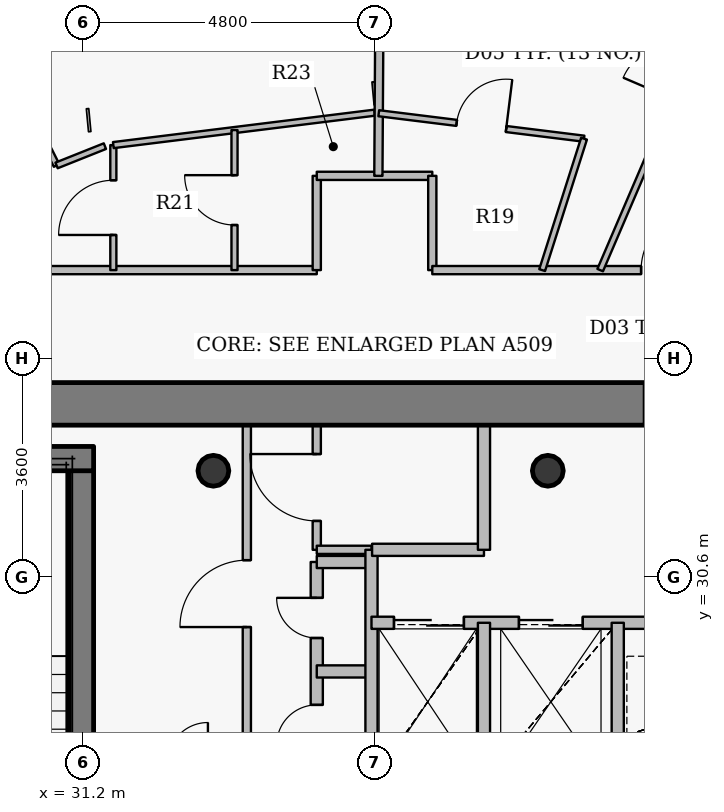
"""IFC4 building model, lengths in metres.
Left out: names, types, materials, properties, quantities, classifications, styles, units other than length and angle.
Written with IfcOpenShell. Run it as: python <this file> out.ifc"""

import sys

from ifc_helpers import new_model, si_unit, direction, frame, frame_2d, origin, origin_2d, place, context, subcontext, project, spatial, rectangle, hollow_circle, extrude, source, transform, mapped, element, fill, save


model = new_model("IFC4")
c1 = context("Model", 3, precision=1e-05, world=origin(), true_north=direction((0.0, 1.0)))
c2 = subcontext(c1, "Body", "Model", "MODEL_VIEW")
j1 = project(units=[si_unit("LENGTHUNIT", "METRE"), si_unit("PLANEANGLEUNIT", "RADIAN")], contexts=[c1])
p1 = place(None, origin())
s1 = spatial("IfcSite", under=j1, at=p1, CompositionType="ELEMENT")
p2 = place(p1, origin())
s2 = spatial("IfcBuilding", under=s1, at=p2, CompositionType="ELEMENT")
p3 = place(p2, frame((0.0, 0.0, 331.6)))
s3 = spatial("IfcBuildingStorey", under=s2, at=p3, CompositionType="ELEMENT", Elevation=331.6)
for number, where, z_axis, x_axis in (
    (1, (38.85, 32.35, 0.0), (0.0, 0.0, 1.0), (1.0, 0.0, 0.0)),
    (2, (33.35, 32.35, 0.0), (0.0, 0.0, 1.0), (1.0, 0.0, 0.0)),
):
    element("IfcColumn", number, at=place(p3, frame(where, z_axis=z_axis, x_axis=x_axis)), inside=s3, PredefinedType="COLUMN", context=c2, shape_type="SweptSolid", body=[
        extrude(hollow_circle(Radius=0.254, WallThickness=0.02, at=origin_2d()), origin(), (0.0, 0.0, 1.0), 3.8),
    ])
p4 = place(p3, frame((31.18, 27.8, 0.0), z_axis=(0.0, 0.0, 1.0), x_axis=(0.0, 1.0, 0.0)))
e3 = element("IfcWall", 3, at=p4, inside=s3, PredefinedType="SHEAR", context=c2, shape_type="SweptSolid", body=[
    extrude(rectangle(XDim=4.75, YDim=0.4, at=frame_2d((2.375, 0.0))), origin(), (0.0, 0.0, 1.0), 3.8),
])
p5 = place(p3, frame((27.25, 32.55, 0.0), z_axis=(0.0, 0.0, 1.0), x_axis=(1.0, 0.0, 0.0)))
e4 = element("IfcWall", 4, at=p5, inside=s3, PredefinedType="SHEAR", context=c2, shape_type="SweptSolid", body=[
    extrude(rectangle(XDim=4.13, YDim=0.4, at=frame_2d((2.065, 0.0))), origin(), (0.0, 0.0, 1.0), 3.8),
])
p6 = place(p3, frame((27.6, 33.45, 0.0), z_axis=(0.0, 0.0, 1.0), x_axis=(1.0, 0.0, 0.0)))
e5 = element("IfcWall", 5, at=p6, inside=s3, PredefinedType="SHEAR", context=c2, shape_type="SweptSolid", body=[
    extrude(rectangle(XDim=16.8, YDim=0.7, at=frame_2d((8.4, 0.0))), origin(), (0.0, 0.0, 1.0), 3.1),
])
p7 = place(p6, frame((12.85, 0.0, 0.0)))
e6 = element("IfcOpeningElement", 6, at=p7, cuts=e5, PredefinedType="OPENING", context=c2, shape_type="SweptSolid", body=[
    extrude(rectangle(XDim=1.15, YDim=2.15, at=origin_2d()), frame((0.575, 0.36, 1.075), z_axis=(0.0, -1.0, 0.0), x_axis=(1.0, 0.0, 0.0)), (0.0, 0.0, 1.0), 0.72),
])
p8 = place(p3, frame((26.58, 35.65, 0.0), z_axis=(0.0, 0.0, 1.0), x_axis=(1.0, 0.0, 0.0)))
e7 = element("IfcWall", 7, at=p8, inside=s3, PredefinedType="PARTITIONING", context=c2, shape_type="SweptSolid", body=[
    extrude(rectangle(XDim=8.47, YDim=0.135, at=frame_2d((4.235, 0.0))), origin(), (0.0, 0.0, 1.0), 3.085),
])
p9 = place(p8, frame((2.082, 0.0, 0.0)))
e8 = element("IfcOpeningElement", 8, at=p9, cuts=e7, PredefinedType="OPENING", context=c2, shape_type="SweptSolid", body=[
    extrude(rectangle(XDim=1.0, YDim=2.15, at=origin_2d()), frame((0.5, 0.078, 1.075), z_axis=(0.0, -1.0, 0.0), x_axis=(1.0, 0.0, 0.0)), (0.0, 0.0, 1.0), 0.155),
])
p10 = place(p3, frame((28.548, 41.781, 0.0), z_axis=(0.0, 0.0, 1.0), x_axis=(0.450197256642, -0.892929129389, 0.0)))
e9 = element("IfcWall", 9, at=p10, inside=s3, PredefinedType="PARTITIONING", context=c2, shape_type="SweptSolid", body=[
    extrude(rectangle(XDim=4.938, YDim=0.1, at=frame_2d((2.469, 0.0))), origin(), (0.0, 0.0, 1.0), 3.035),
])
p11 = place(p10, frame((2.019, 0.0, 0.0)))
e10 = element("IfcOpeningElement", 10, at=p11, cuts=e9, PredefinedType="OPENING", context=c2, shape_type="SweptSolid", body=[
    extrude(rectangle(XDim=0.9, YDim=2.1, at=origin_2d()), frame((0.45, 0.06, 1.05), z_axis=(0.0, -1.0, 0.0), x_axis=(1.0, 0.0, 0.0)), (0.0, 0.0, 1.0), 0.12),
])
p12 = place(p3, frame((30.771, 37.371, 0.0), z_axis=(0.0, 0.0, 1.0), x_axis=(0.928810758689, 0.370554415091, 0.0)))
e11 = element("IfcWall", 11, at=p12, inside=s3, PredefinedType="PARTITIONING", context=c2, shape_type="SweptSolid", body=[
    extrude(rectangle(XDim=0.856, YDim=0.1, at=frame_2d((0.428, 0.0))), origin(), (0.0, 0.0, 1.0), 3.085),
])
p13 = place(p3, frame((31.704, 35.65, 0.0), z_axis=(0.0, 0.0, 1.0), x_axis=(0.0, 1.0, 0.0)))
e12 = element("IfcWall", 12, at=p13, inside=s3, PredefinedType="PARTITIONING", context=c2, shape_type="SweptSolid", body=[
    extrude(rectangle(XDim=2.056, YDim=0.1, at=frame_2d((1.028, 0.0))), origin(), (0.0, 0.0, 1.0), 3.085),
])
p14 = place(p13, frame((0.578, 0.0, 0.0)))
e13 = element("IfcOpeningElement", 13, at=p14, cuts=e12, PredefinedType="OPENING", context=c2, shape_type="SweptSolid", body=[
    extrude(rectangle(XDim=0.9, YDim=2.1, at=origin_2d()), frame((0.45, 0.06, 1.05), z_axis=(0.0, -1.0, 0.0), x_axis=(1.0, 0.0, 0.0)), (0.0, 0.0, 1.0), 0.12),
])
p15 = place(p3, frame((31.704, 37.706, 0.0), z_axis=(0.0, 0.0, 1.0), x_axis=(0.992391131504, 0.123125310604, 0.0)))
e14 = element("IfcWall", 14, at=p15, inside=s3, PredefinedType="PARTITIONING", context=c2, shape_type="SweptSolid", body=[
    extrude(rectangle(XDim=4.329, YDim=0.1, at=frame_2d((2.164, 0.0))), origin(), (0.0, 0.0, 1.0), 3.085),
])
p16 = place(p3, frame((33.697, 35.65, 0.0), z_axis=(0.0, 0.0, 1.0), x_axis=(0.0, 1.0, 0.0)))
e15 = element("IfcWall", 15, at=p16, inside=s3, PredefinedType="PARTITIONING", context=c2, shape_type="SweptSolid", body=[
    extrude(rectangle(XDim=2.303, YDim=0.1, at=frame_2d((1.151, 0.0))), origin(), (0.0, 0.0, 1.0), 3.55),
])
p17 = place(p16, frame((0.741, 0.0, 0.0)))
e16 = element("IfcOpeningElement", 16, at=p17, cuts=e15, PredefinedType="OPENING", context=c2, shape_type="SweptSolid", body=[
    extrude(rectangle(XDim=0.82, YDim=2.1, at=origin_2d()), frame((0.41, 0.06, 1.05), z_axis=(0.0, -1.0, 0.0), x_axis=(1.0, 0.0, 0.0)), (0.0, 0.0, 1.0), 0.12),
])
p18 = place(p3, frame((33.9, 27.56, 0.0), z_axis=(0.0, 0.0, 1.0), x_axis=(0.0, 1.0, 0.0)))
e17 = element("IfcWall", 17, at=p18, inside=s3, PredefinedType="PARTITIONING", context=c2, shape_type="SweptSolid", body=[
    extrude(rectangle(XDim=5.54, YDim=0.135, at=frame_2d((2.77, 0.0))), origin(), (0.0, 0.0, 1.0), 3.135),
])
p19 = place(p18, frame((2.22, 0.0, 0.0)))
e18 = element("IfcOpeningElement", 18, at=p19, cuts=e17, PredefinedType="OPENING", context=c2, shape_type="SweptSolid", body=[
    extrude(rectangle(XDim=1.1, YDim=2.15, at=origin_2d()), frame((0.55, 0.078, 1.075), z_axis=(0.0, -1.0, 0.0), x_axis=(1.0, 0.0, 0.0)), (0.0, 0.0, 1.0), 0.155),
])
p20 = place(p3, frame((35.05, 27.25, 0.0), z_axis=(0.0, 0.0, 1.0), x_axis=(0.0, 1.0, 0.0)))
e19 = element("IfcWall", 19, at=p20, inside=s3, PredefinedType="PARTITIONING", context=c2, shape_type="SweptSolid", body=[
    extrude(rectangle(XDim=3.6, YDim=0.2, at=frame_2d((1.8, 0.0))), origin(), (0.0, 0.0, 1.0), 3.55),
])
p21 = place(p20, frame((0.59, 0.0, 0.0)))
e20 = element("IfcOpeningElement", 20, at=p21, cuts=e19, PredefinedType="OPENING", context=c2, shape_type="SweptSolid", body=[
    extrude(rectangle(XDim=0.66, YDim=2.05, at=origin_2d()), frame((0.33, 0.11, 1.025), z_axis=(0.0, -1.0, 0.0), x_axis=(1.0, 0.0, 0.0)), (0.0, 0.0, 1.0), 0.22),
])
p22 = place(p20, frame((2.35, 0.0, 0.0)))
e21 = element("IfcOpeningElement", 21, at=p22, cuts=e19, PredefinedType="OPENING", context=c2, shape_type="SweptSolid", body=[
    extrude(rectangle(XDim=0.66, YDim=2.05, at=origin_2d()), frame((0.33, 0.11, 1.025), z_axis=(0.0, -1.0, 0.0), x_axis=(1.0, 0.0, 0.0)), (0.0, 0.0, 1.0), 0.22),
])
for number, where, z_axis, x_axis in (
    (22, (35.05, 29.05, 0.0), (0.0, 0.0, 1.0), (1.0, 0.0, 0.0)),
    (23, (35.05, 30.85, 0.0), (0.0, 0.0, 1.0), (1.0, 0.0, 0.0)),
):
    element("IfcWall", number, at=place(p3, frame(where, z_axis=z_axis, x_axis=x_axis)), inside=s3, PredefinedType="PARTITIONING", context=c2, shape_type="SweptSolid", body=[
        extrude(rectangle(XDim=0.9, YDim=0.2, at=frame_2d((0.45, 0.0))), origin(), (0.0, 0.0, 1.0), 3.55),
    ])
p23 = place(p3, frame((35.05, 31.05, 0.0), z_axis=(0.0, 0.0, 1.0), x_axis=(0.0, 1.0, 0.0)))
e24 = element("IfcWall", 24, at=p23, inside=s3, PredefinedType="PARTITIONING", context=c2, shape_type="SweptSolid", body=[
    extrude(rectangle(XDim=2.05, YDim=0.135, at=frame_2d((1.025, 0.0))), origin(), (0.0, 0.0, 1.0), 3.135),
])
p24 = place(p23, frame((0.475, 0.0, 0.0)))
e25 = element("IfcOpeningElement", 25, at=p24, cuts=e24, PredefinedType="OPENING", context=c2, shape_type="SweptSolid", body=[
    extrude(rectangle(XDim=1.1, YDim=2.15, at=origin_2d()), frame((0.55, 0.078, 1.075), z_axis=(0.0, -1.0, 0.0), x_axis=(1.0, 0.0, 0.0)), (0.0, 0.0, 1.0), 0.155),
])
p25 = place(p3, frame((35.05, 31.05, 0.0), z_axis=(0.0, 0.0, 1.0), x_axis=(1.0, 0.0, 0.0)))
e26 = element("IfcWall", 26, at=p25, inside=s3, PredefinedType="PARTITIONING", context=c2, shape_type="SweptSolid", body=[
    extrude(rectangle(XDim=0.9, YDim=0.135, at=frame_2d((0.45, 0.0))), origin(), (0.0, 0.0, 1.0), 3.55),
])
p26 = place(p3, frame((35.05, 35.65, 0.0), z_axis=(0.0, 0.0, 1.0), x_axis=(0.0, 1.0, 0.0)))
e27 = element("IfcWall", 27, at=p26, inside=s3, PredefinedType="PARTITIONING", context=c2, shape_type="SweptSolid", body=[
    extrude(rectangle(XDim=1.55, YDim=0.135, at=frame_2d((0.775, 0.0))), origin(), (0.0, 0.0, 1.0), 3.55),
])
p27 = place(p3, frame((35.05, 37.2, 0.0), z_axis=(0.0, 0.0, 1.0), x_axis=(1.0, 0.0, 0.0)))
e28 = element("IfcWall", 28, at=p27, inside=s3, PredefinedType="PARTITIONING", context=c2, shape_type="SweptSolid", body=[
    extrude(rectangle(XDim=1.9, YDim=0.135, at=frame_2d((0.95, 0.0))), origin(), (0.0, 0.0, 1.0), 3.085),
])
p28 = place(p3, frame((35.95, 27.25, 0.0), z_axis=(0.0, 0.0, 1.0), x_axis=(0.0, 1.0, 0.0)))
e29 = element("IfcWall", 29, at=p28, inside=s3, PredefinedType="PARTITIONING", context=c2, shape_type="SweptSolid", body=[
    extrude(rectangle(XDim=3.8, YDim=0.2, at=frame_2d((1.9, 0.0))), origin(), (0.0, 0.0, 1.0), 3.55),
])
p29 = place(p3, frame((35.95, 29.85, 0.0), z_axis=(0.0, 0.0, 1.0), x_axis=(1.0, 0.0, 0.0)))
e30 = element("IfcWall", 30, at=p29, inside=s3, PredefinedType="PARTITIONING", context=c2, shape_type="SweptSolid", body=[
    extrude(rectangle(XDim=8.49, YDim=0.2, at=frame_2d((4.245, 0.0))), origin(), (0.0, 0.0, 1.0), 3.135),
])
p30 = place(p29, frame((6.1, 0.0, 0.0)))
e31 = element("IfcOpeningElement", 31, at=p30, cuts=e30, PredefinedType="OPENING", context=c2, shape_type="SweptSolid", body=[
    extrude(rectangle(XDim=1.2, YDim=2.15, at=origin_2d()), frame((0.6, 0.11, 1.075), z_axis=(0.0, -1.0, 0.0), x_axis=(1.0, 0.0, 0.0)), (0.0, 0.0, 1.0), 0.22),
])
p31 = place(p29, frame((0.37, 0.0, 0.0)))
e32 = element("IfcOpeningElement", 32, at=p31, cuts=e30, PredefinedType="OPENING", context=c2, shape_type="SweptSolid", body=[
    extrude(rectangle(XDim=1.15, YDim=2.15, at=origin_2d()), frame((0.575, 0.11, 1.075), z_axis=(0.0, -1.0, 0.0), x_axis=(1.0, 0.0, 0.0)), (0.0, 0.0, 1.0), 0.22),
])
p32 = place(p29, frame((2.425, 0.0, 0.0)))
e33 = element("IfcOpeningElement", 33, at=p32, cuts=e30, PredefinedType="OPENING", context=c2, shape_type="SweptSolid", body=[
    extrude(rectangle(XDim=1.05, YDim=2.15, at=origin_2d()), frame((0.525, 0.11, 1.075), z_axis=(0.0, -1.0, 0.0), x_axis=(1.0, 0.0, 0.0)), (0.0, 0.0, 1.0), 0.22),
])
p33 = place(p3, frame((35.96, 31.05, 0.0), z_axis=(0.0, 0.0, 1.0), x_axis=(1.0, 0.0, 0.0)))
e34 = element("IfcWall", 34, at=p33, inside=s3, PredefinedType="PARTITIONING", context=c2, shape_type="SweptSolid", body=[
    extrude(rectangle(XDim=1.84, YDim=0.2, at=frame_2d((0.92, 0.0))), origin(), (0.0, 0.0, 1.0), 3.55),
])
p34 = place(p3, frame((36.063, 37.2, 0.0), z_axis=(0.0, 0.0, 1.0), x_axis=(0.006221912379, 0.999980643716, 0.0)))
e35 = element("IfcWall", 35, at=p34, inside=s3, PredefinedType="PARTITIONING", context=c2, shape_type="SweptSolid", body=[
    extrude(rectangle(XDim=5.729, YDim=0.135, at=frame_2d((2.864, 0.0))), origin(), (0.0, 0.0, 1.0), 3.085),
])
p35 = place(p3, frame((36.07, 38.23, 0.0), z_axis=(0.0, 0.0, 1.0), x_axis=(0.992395574795, -0.123089492354, 0.0)))
e36 = element("IfcWall", 36, at=p35, inside=s3, PredefinedType="PARTITIONING", context=c2, shape_type="SweptSolid", body=[
    extrude(rectangle(XDim=3.402, YDim=0.1, at=frame_2d((1.701, 0.0))), origin(), (0.0, 0.0, 1.0), 3.085),
])
p36 = place(p35, frame((1.291, 0.0, 0.0)))
e37 = element("IfcOpeningElement", 37, at=p36, cuts=e36, PredefinedType="OPENING", context=c2, shape_type="SweptSolid", body=[
    extrude(rectangle(XDim=0.82, YDim=2.1, at=origin_2d()), frame((0.41, 0.06, 1.05), z_axis=(0.0, -1.0, 0.0), x_axis=(1.0, 0.0, 0.0)), (0.0, 0.0, 1.0), 0.12),
])
p37 = place(p3, frame((36.95, 35.65, 0.0), z_axis=(0.0, 0.0, 1.0), x_axis=(0.0, 1.0, 0.0)))
e38 = element("IfcWall", 38, at=p37, inside=s3, PredefinedType="PARTITIONING", context=c2, shape_type="SweptSolid", body=[
    extrude(rectangle(XDim=1.55, YDim=0.135, at=frame_2d((0.775, 0.0))), origin(), (0.0, 0.0, 1.0), 3.55),
])
p38 = place(p3, frame((36.95, 35.65, 0.0), z_axis=(0.0, 0.0, 1.0), x_axis=(1.0, 0.0, 0.0)))
e39 = element("IfcWall", 39, at=p38, inside=s3, PredefinedType="PARTITIONING", context=c2, shape_type="SweptSolid", body=[
    extrude(rectangle(XDim=8.47, YDim=0.135, at=frame_2d((4.235, 0.0))), origin(), (0.0, 0.0, 1.0), 3.085),
])
p39 = place(p38, frame((3.434, 0.0, 0.0)))
e40 = element("IfcOpeningElement", 40, at=p39, cuts=e39, PredefinedType="OPENING", context=c2, shape_type="SweptSolid", body=[
    extrude(rectangle(XDim=1.0, YDim=2.15, at=origin_2d()), frame((0.5, 0.078, 1.075), z_axis=(0.0, -1.0, 0.0), x_axis=(1.0, 0.0, 0.0)), (0.0, 0.0, 1.0), 0.155),
])
p40 = place(p3, frame((37.8, 27.25, 0.0), z_axis=(0.0, 0.0, 1.0), x_axis=(0.0, 1.0, 0.0)))
e41 = element("IfcWall", 41, at=p40, inside=s3, PredefinedType="PARTITIONING", context=c2, shape_type="SweptSolid", body=[
    extrude(rectangle(XDim=2.6, YDim=0.2, at=frame_2d((1.3, 0.0))), origin(), (0.0, 0.0, 1.0), 3.55),
])
p41 = place(p3, frame((37.8, 31.05, 0.0), z_axis=(0.0, 0.0, 1.0), x_axis=(0.0, 1.0, 0.0)))
e42 = element("IfcWall", 42, at=p41, inside=s3, PredefinedType="PARTITIONING", context=c2, shape_type="SweptSolid", body=[
    extrude(rectangle(XDim=2.05, YDim=0.2, at=frame_2d((1.025, 0.0))), origin(), (0.0, 0.0, 1.0), 3.135),
])
p42 = place(p3, frame((38.757, 35.65, 0.0), z_axis=(0.0, 0.0, 1.0), x_axis=(0.303639013206, 0.952787148139, 0.0)))
e43 = element("IfcWall", 43, at=p42, inside=s3, PredefinedType="PARTITIONING", context=c2, shape_type="SweptSolid", body=[
    extrude(rectangle(XDim=2.268, YDim=0.1, at=frame_2d((1.134, 0.0))), origin(), (0.0, 0.0, 1.0), 3.235),
])
p43 = place(p3, frame((39.711, 35.65, 0.0), z_axis=(0.0, 0.0, 1.0), x_axis=(0.39425107449, 0.919002769454, 0.0)))
e44 = element("IfcWall", 44, at=p43, inside=s3, PredefinedType="PARTITIONING", context=c2, shape_type="SweptSolid", body=[
    extrude(rectangle(XDim=7.015, YDim=0.1, at=frame_2d((3.508, 0.0))), origin(), (0.0, 0.0, 1.0), 3.035),
])
p44 = place(p43, frame((3.058, 0.0, 0.0)))
e45 = element("IfcOpeningElement", 45, at=p44, cuts=e44, PredefinedType="OPENING", context=c2, shape_type="SweptSolid", body=[
    extrude(rectangle(XDim=0.9, YDim=2.1, at=origin_2d()), frame((0.45, 0.06, 1.05), z_axis=(0.0, -1.0, 0.0), x_axis=(1.0, 0.0, 0.0)), (0.0, 0.0, 1.0), 0.12),
])
p45 = place(p3, frame((40.0, 25.45, 0.0), z_axis=(0.0, 0.0, 1.0), x_axis=(0.0, 1.0, 0.0)))
e46 = element("IfcWall", 46, at=p45, inside=s3, PredefinedType="PARTITIONING", context=c2, shape_type="SweptSolid", body=[
    extrude(rectangle(XDim=4.4, YDim=0.2, at=frame_2d((2.2, 0.0))), origin(), (0.0, 0.0, 1.0), 3.55),
])
m1 = source(origin(), c2, "Body", "SweptSolid", [
    extrude(rectangle(XDim=1.15, YDim=2.15, at=origin_2d()), frame((0.575, 0.025, 1.075), z_axis=(0.0, -1.0, 0.0), x_axis=(1.0, 0.0, 0.0)), (0.0, 0.0, 1.0), 0.05),
])
p46 = place(p31, origin())
e47 = element("IfcDoor", 47, at=p46, inside=s3, OperationType="DOUBLE_DOOR_SLIDING", PredefinedType="USERDEFINED", context=c2, shape_type="MappedRepresentation", body=[
    mapped(m1, transform((0.0, 0.0, 0.0), x_axis=(1.0, 0.0, 0.0), y_axis=(0.0, 1.0, 0.0), z_axis=(0.0, 0.0, 1.0), scale=1.0)),
])
fill(e32, e47)
m2 = source(origin(), c2, "Body", "SweptSolid", [
    extrude(rectangle(XDim=1.05, YDim=2.15, at=origin_2d()), frame((0.525, 0.025, 1.075), z_axis=(0.0, -1.0, 0.0), x_axis=(1.0, 0.0, 0.0)), (0.0, 0.0, 1.0), 0.05),
])
p47 = place(p32, origin())
e48 = element("IfcDoor", 48, at=p47, inside=s3, OperationType="DOUBLE_DOOR_SLIDING", PredefinedType="USERDEFINED", context=c2, shape_type="MappedRepresentation", body=[
    mapped(m2, transform((0.0, 0.0, 0.0), x_axis=(1.0, 0.0, 0.0), y_axis=(0.0, 1.0, 0.0), z_axis=(0.0, 0.0, 1.0), scale=1.0)),
])
fill(e33, e48)
m3 = source(origin(), c2, "Body", "SweptSolid", [
    extrude(rectangle(XDim=1.0, YDim=2.15, at=origin_2d()), frame((0.5, 0.025, 1.075), z_axis=(0.0, -1.0, 0.0), x_axis=(1.0, 0.0, 0.0)), (0.0, 0.0, 1.0), 0.05),
])
p48 = place(p39, origin())
e49 = element("IfcDoor", 49, at=p48, inside=s3, OperationType="SINGLE_SWING_RIGHT", PredefinedType="DOOR", context=c2, shape_type="MappedRepresentation", body=[
    mapped(m3, transform((0.0, 0.0, 0.0), x_axis=(1.0, 0.0, 0.0), y_axis=(0.0, 1.0, 0.0), z_axis=(0.0, 0.0, 1.0), scale=1.0)),
])
fill(e40, e49)
m4 = source(origin(), c2, "Body", "SweptSolid", [
    extrude(rectangle(XDim=0.82, YDim=2.1, at=origin_2d()), frame((0.41, 0.025, 1.05), z_axis=(0.0, -1.0, 0.0), x_axis=(1.0, 0.0, 0.0)), (0.0, 0.0, 1.0), 0.05),
])
p49 = place(p36, origin())
e50 = element("IfcDoor", 50, at=p49, inside=s3, OperationType="SINGLE_SWING_RIGHT", PredefinedType="DOOR", context=c2, shape_type="MappedRepresentation", body=[
    mapped(m4, transform((0.0, 0.0, 0.0), x_axis=(1.0, 0.0, 0.0), y_axis=(0.0, 1.0, 0.0), z_axis=(0.0, 0.0, 1.0), scale=1.0)),
])
fill(e37, e50)
m5 = source(origin(), c2, "Body", "SweptSolid", [
    extrude(rectangle(XDim=0.9, YDim=2.1, at=origin_2d()), frame((0.45, 0.025, 1.05), z_axis=(0.0, -1.0, 0.0), x_axis=(1.0, 0.0, 0.0)), (0.0, 0.0, 1.0), 0.05),
])
p50 = place(p14, origin())
e51 = element("IfcDoor", 51, at=p50, inside=s3, OperationType="SINGLE_SWING_LEFT", PredefinedType="DOOR", context=c2, shape_type="MappedRepresentation", body=[
    mapped(m5, transform((0.0, 0.0, 0.0), x_axis=(1.0, 0.0, 0.0), y_axis=(0.0, 1.0, 0.0), z_axis=(0.0, 0.0, 1.0), scale=1.0)),
])
fill(e13, e51)
p51 = place(p17, origin())
e52 = element("IfcDoor", 52, at=p51, inside=s3, OperationType="SINGLE_SWING_RIGHT", PredefinedType="DOOR", context=c2, shape_type="MappedRepresentation", body=[
    mapped(m4, transform((0.0, 0.0, 0.0), x_axis=(1.0, 0.0, 0.0), y_axis=(0.0, 1.0, 0.0), z_axis=(0.0, 0.0, 1.0), scale=1.0)),
])
fill(e16, e52)
m6 = source(origin(), c2, "Body", "SweptSolid", [
    extrude(rectangle(XDim=0.66, YDim=2.05, at=origin_2d()), frame((0.33, 0.025, 1.025), z_axis=(0.0, -1.0, 0.0), x_axis=(1.0, 0.0, 0.0)), (0.0, 0.0, 1.0), 0.05),
])
p52 = place(p21, origin())
e53 = element("IfcDoor", 53, at=p52, inside=s3, OperationType="SINGLE_SWING_LEFT", PredefinedType="USERDEFINED", context=c2, shape_type="MappedRepresentation", body=[
    mapped(m6, transform((0.0, 0.0, 0.0), x_axis=(1.0, 0.0, 0.0), y_axis=(0.0, 1.0, 0.0), z_axis=(0.0, 0.0, 1.0), scale=1.0)),
])
fill(e20, e53)
p53 = place(p22, origin())
e54 = element("IfcDoor", 54, at=p53, inside=s3, OperationType="SINGLE_SWING_RIGHT", PredefinedType="USERDEFINED", context=c2, shape_type="MappedRepresentation", body=[
    mapped(m6, transform((0.0, 0.0, 0.0), x_axis=(1.0, 0.0, 0.0), y_axis=(0.0, 1.0, 0.0), z_axis=(0.0, 0.0, 1.0), scale=1.0)),
])
fill(e21, e54)
m7 = source(origin(), c2, "Body", "SweptSolid", [
    extrude(rectangle(XDim=1.1, YDim=2.15, at=origin_2d()), frame((0.55, 0.025, 1.075), z_axis=(0.0, -1.0, 0.0), x_axis=(1.0, 0.0, 0.0)), (0.0, 0.0, 1.0), 0.05),
])
p54 = place(p19, origin())
e55 = element("IfcDoor", 55, at=p54, inside=s3, OperationType="SINGLE_SWING_LEFT", PredefinedType="DOOR", context=c2, shape_type="MappedRepresentation", body=[
    mapped(m7, transform((0.0, 0.0, 0.0), x_axis=(1.0, 0.0, 0.0), y_axis=(0.0, 1.0, 0.0), z_axis=(0.0, 0.0, 1.0), scale=1.0)),
])
fill(e18, e55)
p55 = place(p24, origin())
e56 = element("IfcDoor", 56, at=p55, inside=s3, OperationType="SINGLE_SWING_RIGHT", PredefinedType="DOOR", context=c2, shape_type="MappedRepresentation", body=[
    mapped(m7, transform((0.0, 0.0, 0.0), x_axis=(1.0, 0.0, 0.0), y_axis=(0.0, 1.0, 0.0), z_axis=(0.0, 0.0, 1.0), scale=1.0)),
])
fill(e25, e56)
save(model, sys.argv[1])
